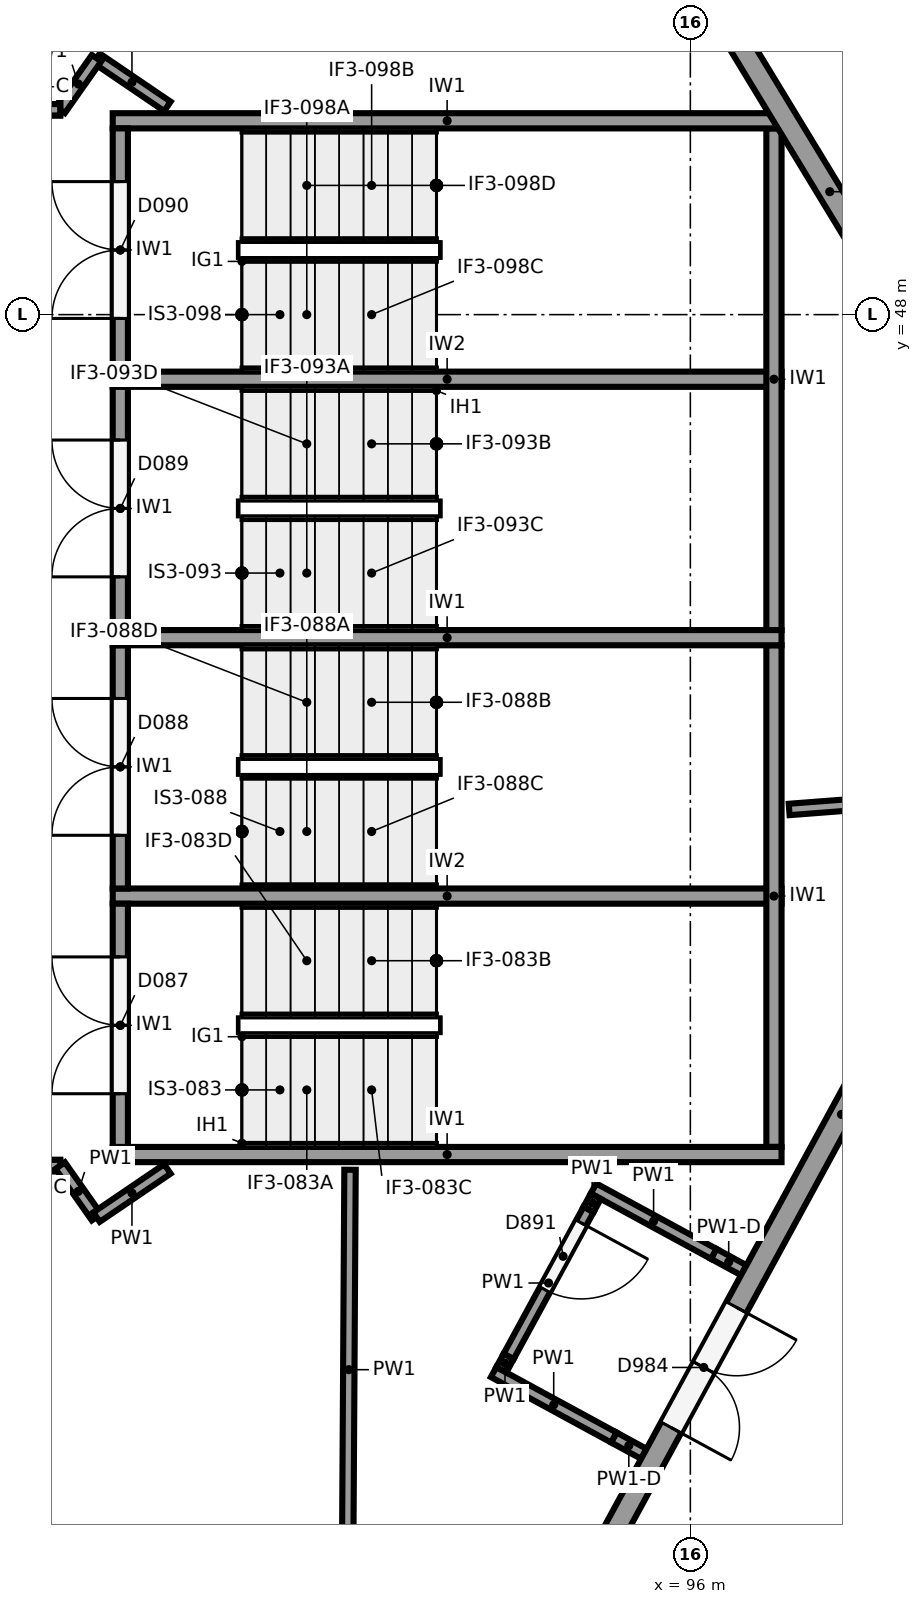
"""IFC4 building model, lengths in metres.
Left out: names, types, materials, properties, quantities, classifications, styles, units other than length and angle.
Written with IfcOpenShell. Run it as: python <this file> out.ifc"""

import sys

from ifc_helpers import new_model, si_unit, direction, frame, frame_2d, origin, place, context, subcontext, project, spatial, rectangle, extrude, element, fill, save


model = new_model("IFC4")
c1 = context("Model", 3, precision=1e-05, world=origin(), true_north=direction((0.0, 1.0)))
c2 = subcontext(c1, "Body", "Model", "MODEL_VIEW")
j1 = project(units=[si_unit("LENGTHUNIT", "METRE"), si_unit("PLANEANGLEUNIT", "RADIAN")], contexts=[c1])
p1 = place(None, origin())
s1 = spatial("IfcSite", under=j1, at=p1, CompositionType="ELEMENT")
p2 = place(p1, origin())
s2 = spatial("IfcBuilding", under=s1, at=p2, CompositionType="ELEMENT")
p3 = place(p2, frame((0.0, 0.0, 6.5)))
s3 = spatial("IfcBuildingStorey", under=s2, at=p3, CompositionType="ELEMENT", Elevation=6.5)
p4 = place(p3, frame((101.161, 43.311, 0.0), z_axis=(0.0, 0.0, 1.0), x_axis=(-0.477867771117, -0.878431780691, 0.0)))
e1 = element("IfcWall", 1, at=p4, inside=s3, PredefinedType="SOLIDWALL", context=c2, shape_type="SweptSolid", body=[
    extrude(rectangle(XDim=13.28, YDim=0.3, at=frame_2d((6.64, 0.0))), origin(), (0.0, 0.0, 1.0), 3.85),
])
p5 = place(p4, frame((9.53, 0.0, 0.0)))
e2 = element("IfcOpeningElement", 2, at=p5, cuts=e1, PredefinedType="OPENING", context=c2, shape_type="SweptSolid", body=[
    extrude(rectangle(XDim=1.8, YDim=2.4, at=frame_2d((0.9, 1.2))), frame((0.0, 0.16, 0.0), z_axis=(0.0, -1.0, 0.0), x_axis=(1.0, 0.0, 0.0)), (0.0, 0.0, 1.0), 0.32),
])
p6 = place(p3, frame((94.528, 55.057, 0.0), z_axis=(0.0, 0.0, 1.0), x_axis=(0.519362860044, -0.854553813172, 0.0)))
e3 = element("IfcWall", 3, at=p6, inside=s3, PredefinedType="SOLIDWALL", context=c2, shape_type="SweptSolid", body=[
    extrude(rectangle(XDim=12.732, YDim=0.3, at=frame_2d((6.366, 0.0))), origin(), (0.0, 0.0, 1.0), 3.85),
])
for number, where, z_axis, x_axis in (
    (4, (97.2, 36.95, 0.0), (0.0, 0.0, 1.0), (-1.0, 0.0, 0.0)),
    (5, (97.2, 43.75, 0.0), (0.0, 0.0, 1.0), (-1.0, 0.0, 0.0)),
    (6, (97.2, 50.55, 0.0), (0.0, 0.0, 1.0), (-1.0, 0.0, 0.0)),
):
    element("IfcWall", number, at=place(p3, frame(where, z_axis=z_axis, x_axis=x_axis)), inside=s3, PredefinedType="SHEAR", context=c2, shape_type="SweptSolid", body=[
        extrude(rectangle(XDim=8.8, YDim=0.2, at=frame_2d((4.4, 0.0))), origin(), (0.0, 0.0, 1.0), 5.15),
    ])
for number, where, z_axis, x_axis in (
    (7, (97.1, 37.05, 0.0), (0.0, 0.0, 1.0), (0.0, 1.0, 0.0)),
    (8, (97.1, 43.85, 0.0), (0.0, 0.0, 1.0), (0.0, 1.0, 0.0)),
):
    element("IfcWall", number, at=place(p3, frame(where, z_axis=z_axis, x_axis=x_axis)), inside=s3, PredefinedType="SHEAR", context=c2, shape_type="SweptSolid", body=[
        extrude(rectangle(XDim=6.6, YDim=0.2, at=frame_2d((3.3, 0.0))), origin(), (0.0, 0.0, 1.0), 5.15),
    ])
for number, where, z_axis, x_axis in (
    (9, (97.2, 40.35, 0.0), (0.0, 0.0, 1.0), (-1.0, 0.0, 0.0)),
    (10, (97.2, 47.15, 0.0), (0.0, 0.0, 1.0), (-1.0, 0.0, 0.0)),
):
    element("IfcWall", number, at=place(p3, frame(where, z_axis=z_axis, x_axis=x_axis)), inside=s3, PredefinedType="SHEAR", context=c2, shape_type="SweptSolid", body=[
        extrude(rectangle(XDim=8.8, YDim=0.2, at=frame_2d((4.4, 0.0))), origin(), (0.0, 0.0, 1.0), 5.15),
    ])
p7 = place(p3, frame((88.5, 37.05, 0.0), z_axis=(0.0, 0.0, 1.0), x_axis=(0.0, 1.0, 0.0)))
e11 = element("IfcWall", 11, at=p7, inside=s3, PredefinedType="SHEAR", context=c2, shape_type="SweptSolid", body=[
    extrude(rectangle(XDim=3.2, YDim=0.2, at=frame_2d((1.6, 0.0))), origin(), (0.0, 0.0, 1.0), 5.15),
])
p8 = place(p7, frame((0.7, 0.0, 0.0)))
e12 = element("IfcOpeningElement", 12, at=p8, cuts=e11, PredefinedType="OPENING", context=c2, shape_type="SweptSolid", body=[
    extrude(rectangle(XDim=1.8, YDim=2.1, at=frame_2d((0.9, 1.05))), frame((0.0, 0.11, 0.0), z_axis=(0.0, -1.0, 0.0), x_axis=(1.0, 0.0, 0.0)), (0.0, 0.0, 1.0), 0.22),
])
p9 = place(p3, frame((88.5, 40.45, 0.0), z_axis=(0.0, 0.0, 1.0), x_axis=(0.0, 1.0, 0.0)))
e13 = element("IfcWall", 13, at=p9, inside=s3, PredefinedType="SHEAR", context=c2, shape_type="SweptSolid", body=[
    extrude(rectangle(XDim=3.2, YDim=0.2, at=frame_2d((1.6, 0.0))), origin(), (0.0, 0.0, 1.0), 5.15),
])
p10 = place(p9, frame((0.7, 0.0, 0.0)))
e14 = element("IfcOpeningElement", 14, at=p10, cuts=e13, PredefinedType="OPENING", context=c2, shape_type="SweptSolid", body=[
    extrude(rectangle(XDim=1.8, YDim=2.1, at=frame_2d((0.9, 1.05))), frame((0.0, 0.11, 0.0), z_axis=(0.0, -1.0, 0.0), x_axis=(1.0, 0.0, 0.0)), (0.0, 0.0, 1.0), 0.22),
])
p11 = place(p3, frame((88.5, 43.85, 0.0), z_axis=(0.0, 0.0, 1.0), x_axis=(0.0, 1.0, 0.0)))
e15 = element("IfcWall", 15, at=p11, inside=s3, PredefinedType="SHEAR", context=c2, shape_type="SweptSolid", body=[
    extrude(rectangle(XDim=3.2, YDim=0.2, at=frame_2d((1.6, 0.0))), origin(), (0.0, 0.0, 1.0), 5.15),
])
p12 = place(p11, frame((0.7, 0.0, 0.0)))
e16 = element("IfcOpeningElement", 16, at=p12, cuts=e15, PredefinedType="OPENING", context=c2, shape_type="SweptSolid", body=[
    extrude(rectangle(XDim=1.8, YDim=2.1, at=frame_2d((0.9, 1.05))), frame((0.0, 0.11, 0.0), z_axis=(0.0, -1.0, 0.0), x_axis=(1.0, 0.0, 0.0)), (0.0, 0.0, 1.0), 0.22),
])
p13 = place(p3, frame((88.5, 47.25, 0.0), z_axis=(0.0, 0.0, 1.0), x_axis=(0.0, 1.0, 0.0)))
e17 = element("IfcWall", 17, at=p13, inside=s3, PredefinedType="SHEAR", context=c2, shape_type="SweptSolid", body=[
    extrude(rectangle(XDim=3.2, YDim=0.2, at=frame_2d((1.6, 0.0))), origin(), (0.0, 0.0, 1.0), 5.15),
])
p14 = place(p13, frame((0.7, 0.0, 0.0)))
e18 = element("IfcOpeningElement", 18, at=p14, cuts=e17, PredefinedType="OPENING", context=c2, shape_type="SweptSolid", body=[
    extrude(rectangle(XDim=1.8, YDim=2.1, at=frame_2d((0.9, 1.05))), frame((0.0, 0.11, 0.0), z_axis=(0.0, -1.0, 0.0), x_axis=(1.0, 0.0, 0.0)), (0.0, 0.0, 1.0), 0.22),
])
p15 = place(p3, frame((91.49, 31.489, 0.0), z_axis=(0.0, 0.0, 1.0), x_axis=(0.006125459352, 0.999981239198, 0.0)))
e19 = element("IfcWall", 19, at=p15, inside=s3, PredefinedType="PARTITIONING", context=c2, shape_type="SweptSolid", body=[
    extrude(rectangle(XDim=5.261, YDim=0.15, at=frame_2d((2.63, 0.0))), origin(), (0.0, 0.0, 1.0), 5.15),
])
p16 = place(p3, frame((97.3, 41.49, 0.0), z_axis=(0.0, 0.0, 1.0), x_axis=(0.99706720675, 0.076530942913, 0.0)))
e20 = element("IfcWall", 20, at=p16, inside=s3, PredefinedType="PARTITIONING", context=c2, shape_type="SweptSolid", body=[
    extrude(rectangle(XDim=2.255, YDim=0.15, at=frame_2d((1.128, 0.0))), origin(), (0.0, 0.0, 1.0), 5.15),
])
p17 = place(p3, frame((81.355, 36.805, 0.0), z_axis=(0.0, 0.0, 1.0), x_axis=(1.0, 0.0, 0.0)))
e21 = element("IfcWall", 21, at=p17, inside=s3, PredefinedType="PARTITIONING", context=c2, shape_type="SweptSolid", body=[
    extrude(rectangle(XDim=6.354, YDim=0.15, at=frame_2d((3.177, 0.0))), origin(), (0.0, 0.0, 1.0), 4.05),
])
p18 = place(p17, frame((3.85, 0.0, 0.0)))
e22 = element("IfcOpeningElement", 22, at=p18, cuts=e21, PredefinedType="OPENING", context=c2, shape_type="SweptSolid", body=[
    extrude(rectangle(XDim=1.8, YDim=2.1, at=frame_2d((0.9, 1.05))), frame((0.0, 0.085, 0.0), z_axis=(0.0, -1.0, 0.0), x_axis=(1.0, 0.0, 0.0)), (0.0, 0.0, 1.0), 0.17),
])
p19 = place(p3, frame((87.055, 36.805, 4.05), z_axis=(0.0, 0.0, 1.0), x_axis=(1.0, 0.0, 0.0)))
e23 = element("IfcWall", 23, at=p19, inside=s3, PredefinedType="PARTITIONING", context=c2, shape_type="SweptSolid", body=[
    extrude(rectangle(XDim=0.654, YDim=0.15, at=frame_2d((0.327, 0.0))), origin(), (0.0, 0.0, 1.0), 1.1),
])
p20 = place(p3, frame((87.709, 36.805, 0.0), z_axis=(0.0, 0.0, 1.0), x_axis=(0.575573582652, -0.81774999294, 0.0)))
e24 = element("IfcWall", 24, at=p20, inside=s3, PredefinedType="PARTITIONING", context=c2, shape_type="SweptSolid", body=[
    extrude(rectangle(XDim=0.83, YDim=0.15, at=frame_2d((0.415, 0.0))), origin(), (0.0, 0.0, 1.0), 5.15),
])
for number, where, z_axis, x_axis in (
    (25, (88.187, 36.126, 0.0), (0.0, 0.0, 1.0), (0.827, 0.562, 0.0)),
    (26, (89.12, 50.74, 0.0), (0.0, 0.0, 1.0), (-0.827, 0.562, 0.0)),
):
    element("IfcWall", number, at=place(p3, frame(where, z_axis=z_axis, x_axis=x_axis)), inside=s3, PredefinedType="PARTITIONING", context=c2, shape_type="SweptSolid", body=[
        extrude(rectangle(XDim=1.128, YDim=0.15, at=frame_2d((0.564, 0.0))), origin(), (0.0, 0.0, 1.0), 5.15),
    ])
p21 = place(p3, frame((88.187, 51.374, 0.0), z_axis=(0.0, 0.0, 1.0), x_axis=(-0.575376756214, -0.817888493872, 0.0)))
e27 = element("IfcWall", 27, at=p21, inside=s3, PredefinedType="PARTITIONING", context=c2, shape_type="SweptSolid", body=[
    extrude(rectangle(XDim=0.83, YDim=0.15, at=frame_2d((0.415, 0.0))), origin(), (0.0, 0.0, 1.0), 5.15),
])
p22 = place(p3, frame((87.709, 50.695, 0.0), z_axis=(0.0, 0.0, 1.0), x_axis=(-1.0, 0.0, 0.0)))
e28 = element("IfcWall", 28, at=p22, inside=s3, PredefinedType="PARTITIONING", context=c2, shape_type="SweptSolid", body=[
    extrude(rectangle(XDim=3.704, YDim=0.15, at=frame_2d((1.852, 0.0))), origin(), (0.0, 0.0, 1.0), 4.05),
])
p23 = place(p22, frame((0.65, 0.0, 0.0)))
e29 = element("IfcOpeningElement", 29, at=p23, cuts=e28, PredefinedType="OPENING", context=c2, shape_type="SweptSolid", body=[
    extrude(rectangle(XDim=1.8, YDim=2.1, at=frame_2d((0.9, 1.05))), frame((0.0, 0.085, 0.0), z_axis=(0.0, -1.0, 0.0), x_axis=(1.0, 0.0, 0.0)), (0.0, 0.0, 1.0), 0.17),
])
p24 = place(p3, frame((87.709, 50.695, 4.05), z_axis=(0.0, 0.0, 1.0), x_axis=(-1.0, 0.0, 0.0)))
e30 = element("IfcWall", 30, at=p24, inside=s3, PredefinedType="PARTITIONING", context=c2, shape_type="SweptSolid", body=[
    extrude(rectangle(XDim=0.6, YDim=0.15, at=frame_2d((0.3, 0.0))), origin(), (0.0, 0.0, 1.0), 1.1),
])
p25 = place(p3, frame((96.702, 35.428, 0.0), z_axis=(0.0, 0.0, 1.0), x_axis=(-0.878372019733, 0.477977609256, 0.0)))
e31 = element("IfcWall", 31, at=p25, inside=s3, PredefinedType="PARTITIONING", context=c2, shape_type="SweptSolid", body=[
    extrude(rectangle(XDim=0.45, YDim=0.15, at=frame_2d((0.225, 0.0))), origin(), (0.0, 0.0, 1.0), 3.85),
])
p26 = place(p3, frame((96.307, 35.643, 0.0), z_axis=(0.0, 0.0, 1.0), x_axis=(-0.878428962466, 0.477872951632, 0.0)))
e32 = element("IfcWall", 32, at=p26, inside=s3, PredefinedType="PARTITIONING", context=c2, shape_type="SweptSolid", body=[
    extrude(rectangle(XDim=1.8, YDim=0.15, at=frame_2d((0.9, 0.0))), origin(), (0.0, 0.0, 1.0), 5.15),
])
p27 = place(p3, frame((95.388, 33.013, 0.0), z_axis=(0.0, 0.0, 1.0), x_axis=(-0.878372019733, 0.477977609256, 0.0)))
e33 = element("IfcWall", 33, at=p27, inside=s3, PredefinedType="PARTITIONING", context=c2, shape_type="SweptSolid", body=[
    extrude(rectangle(XDim=0.45, YDim=0.15, at=frame_2d((0.225, 0.0))), origin(), (0.0, 0.0, 1.0), 3.85),
])
p28 = place(p3, frame((94.993, 33.228, 0.0), z_axis=(0.0, 0.0, 1.0), x_axis=(-0.878459932885, 0.477816017223, 0.0)))
e34 = element("IfcWall", 34, at=p28, inside=s3, PredefinedType="PARTITIONING", context=c2, shape_type="SweptSolid", body=[
    extrude(rectangle(XDim=1.8, YDim=0.15, at=frame_2d((0.9, 0.0))), origin(), (0.0, 0.0, 1.0), 5.15),
])
p29 = place(p3, frame((94.756, 36.402, 0.0), z_axis=(0.0, 0.0, 1.0), x_axis=(-0.478168266369, -0.878268244352, 0.0)))
e35 = element("IfcWall", 35, at=p29, inside=s3, PredefinedType="PARTITIONING", context=c2, shape_type="SweptSolid", body=[
    extrude(rectangle(XDim=0.2, YDim=0.15, at=frame_2d((0.1, 0.0))), origin(), (0.0, 0.0, 1.0), 5.15),
])
p30 = place(p3, frame((94.66, 36.226, 0.0), z_axis=(0.0, 0.0, 1.0), x_axis=(-0.477887643273, -0.878420969927, 0.0)))
e36 = element("IfcWall", 36, at=p30, inside=s3, PredefinedType="PARTITIONING", context=c2, shape_type="SweptSolid", body=[
    extrude(rectangle(XDim=2.2, YDim=0.15, at=frame_2d((1.1, 0.0))), origin(), (0.0, 0.0, 1.0), 5.15),
])
p31 = place(p30, frame((0.2, 0.0, 0.0)))
e37 = element("IfcOpeningElement", 37, at=p31, cuts=e36, PredefinedType="OPENING", context=c2, shape_type="SweptSolid", body=[
    extrude(rectangle(XDim=1.0, YDim=2.1, at=frame_2d((0.5, 1.05))), frame((0.0, 0.085, 0.0), z_axis=(0.0, -1.0, 0.0), x_axis=(1.0, 0.0, 0.0)), (0.0, 0.0, 1.0), 0.17),
])
p32 = place(p3, frame((93.609, 34.294, 0.0), z_axis=(0.0, 0.0, 1.0), x_axis=(-0.477226530971, -0.878780312785, 0.0)))
e38 = element("IfcWall", 38, at=p32, inside=s3, PredefinedType="PARTITIONING", context=c2, shape_type="SweptSolid", body=[
    extrude(rectangle(XDim=0.2, YDim=0.15, at=frame_2d((0.1, 0.0))), origin(), (0.0, 0.0, 1.0), 5.15),
])
p33 = place(p5, origin())
e39 = element("IfcDoor", 39, at=p33, inside=s3, OperationType="DOUBLE_DOOR_SINGLE_SWING", PredefinedType="DOOR", context=c2, shape_type="SweptSolid", body=[
    extrude(rectangle(XDim=1.8, YDim=2.4, at=frame_2d((0.9, 1.2))), frame((0.0, 0.025, 0.0), z_axis=(0.0, -1.0, 0.0), x_axis=(1.0, 0.0, 0.0)), (0.0, 0.0, 1.0), 0.05),
])
fill(e2, e39)
p34 = place(p8, origin())
e40 = element("IfcDoor", 40, at=p34, inside=s3, OperationType="DOUBLE_DOOR_SINGLE_SWING", PredefinedType="DOOR", context=c2, shape_type="SweptSolid", body=[
    extrude(rectangle(XDim=1.8, YDim=2.1, at=frame_2d((0.9, 1.05))), frame((0.0, 0.025, 0.0), z_axis=(0.0, -1.0, 0.0), x_axis=(1.0, 0.0, 0.0)), (0.0, 0.0, 1.0), 0.05),
])
fill(e12, e40)
p35 = place(p10, origin())
e41 = element("IfcDoor", 41, at=p35, inside=s3, OperationType="DOUBLE_DOOR_SINGLE_SWING", PredefinedType="DOOR", context=c2, shape_type="SweptSolid", body=[
    extrude(rectangle(XDim=1.8, YDim=2.1, at=frame_2d((0.9, 1.05))), frame((0.0, 0.025, 0.0), z_axis=(0.0, -1.0, 0.0), x_axis=(1.0, 0.0, 0.0)), (0.0, 0.0, 1.0), 0.05),
])
fill(e14, e41)
p36 = place(p12, origin())
e42 = element("IfcDoor", 42, at=p36, inside=s3, OperationType="DOUBLE_DOOR_SINGLE_SWING", PredefinedType="DOOR", context=c2, shape_type="SweptSolid", body=[
    extrude(rectangle(XDim=1.8, YDim=2.1, at=frame_2d((0.9, 1.05))), frame((0.0, 0.025, 0.0), z_axis=(0.0, -1.0, 0.0), x_axis=(1.0, 0.0, 0.0)), (0.0, 0.0, 1.0), 0.05),
])
fill(e16, e42)
p37 = place(p14, origin())
e43 = element("IfcDoor", 43, at=p37, inside=s3, OperationType="DOUBLE_DOOR_SINGLE_SWING", PredefinedType="DOOR", context=c2, shape_type="SweptSolid", body=[
    extrude(rectangle(XDim=1.8, YDim=2.1, at=frame_2d((0.9, 1.05))), frame((0.0, 0.025, 0.0), z_axis=(0.0, -1.0, 0.0), x_axis=(1.0, 0.0, 0.0)), (0.0, 0.0, 1.0), 0.05),
])
fill(e18, e43)
p38 = place(p31, origin())
e44 = element("IfcDoor", 44, at=p38, inside=s3, OperationType="SINGLE_SWING_LEFT", PredefinedType="DOOR", context=c2, shape_type="SweptSolid", body=[
    extrude(rectangle(XDim=1.0, YDim=2.1, at=frame_2d((0.5, 1.05))), frame((0.0, 0.025, 0.0), z_axis=(0.0, -1.0, 0.0), x_axis=(1.0, 0.0, 0.0)), (0.0, 0.0, 1.0), 0.05),
])
fill(e37, e44)
save(model, sys.argv[1])
